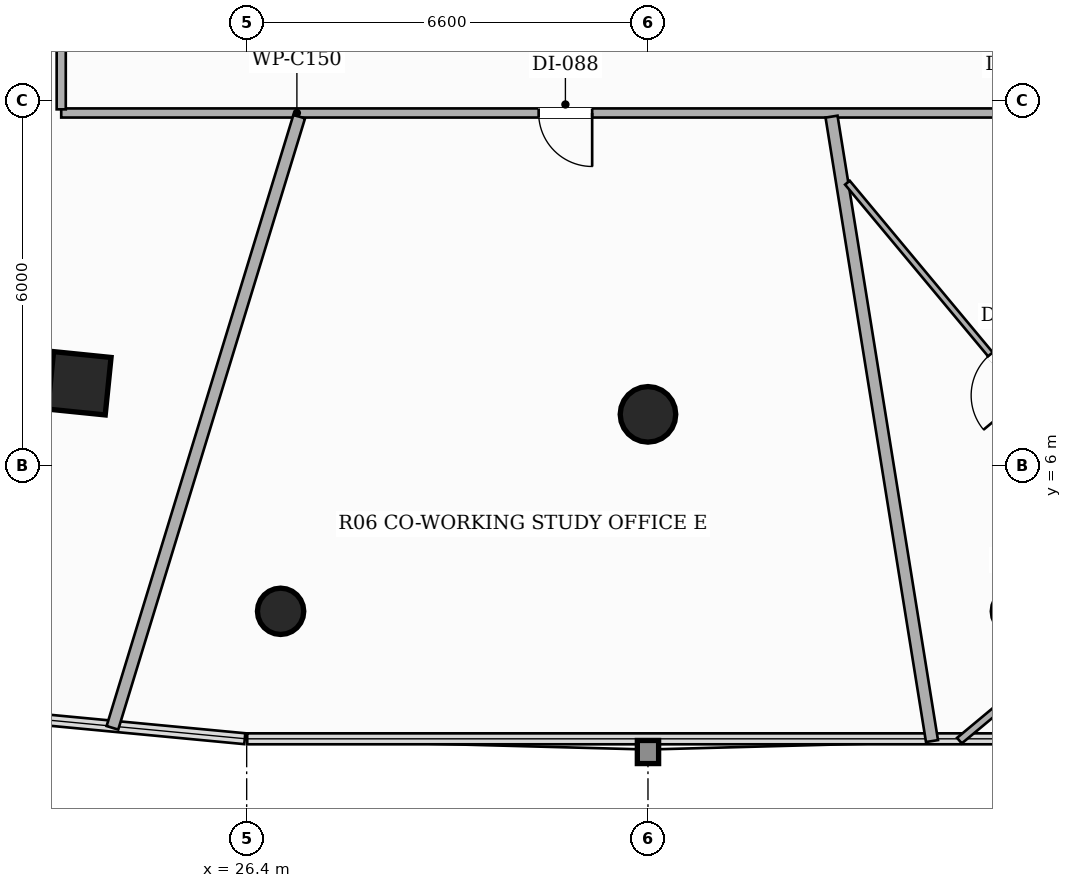
"""IFC4 building model, lengths in metres.
Left out: names, types, materials, properties, quantities, classifications, styles, units other than length and angle.
Written with IfcOpenShell. Run it as: python <this file> out.ifc"""

import sys

from ifc_helpers import new_model, si_unit, direction, frame, frame_2d, origin, origin_2d, place, context, subcontext, project, spatial, rectangle, hollow_rectangle, hollow_circle, extrude, element, fill, save


model = new_model("IFC4")
c1 = context("Model", 3, precision=1e-05, world=origin(), true_north=direction((0.0, 1.0)))
c2 = subcontext(c1, "Body", "Model", "MODEL_VIEW")
j1 = project(units=[si_unit("LENGTHUNIT", "METRE"), si_unit("PLANEANGLEUNIT", "RADIAN")], contexts=[c1])
p1 = place(None, origin())
s1 = spatial("IfcSite", under=j1, at=p1, CompositionType="ELEMENT")
p2 = place(p1, origin())
s2 = spatial("IfcBuilding", under=s1, at=p2, CompositionType="ELEMENT")
p3 = place(p2, frame((0.0, 0.0, 43.4)))
s3 = spatial("IfcBuildingStorey", under=s2, at=p3, CompositionType="ELEMENT", Elevation=43.4)
p4 = place(p3, frame((23.649, 7.355, 0.0), z_axis=(0.0, 0.0, 1.0), x_axis=(-0.994880708829, 0.101056297183, 0.0)))
e1 = element("IfcColumn", 1, at=p4, inside=s3, PredefinedType="COLUMN", context=c2, shape_type="SweptSolid", body=[
    extrude(hollow_rectangle(XDim=0.95, YDim=0.95, WallThickness=0.032, at=origin_2d()), origin(), (0.0, 0.0, 1.0), 3.3),
])
p5 = place(p3, frame((33.0, 6.844, 0.0), z_axis=(0.0, 0.0, 1.0), x_axis=(1.0, 0.0, 0.0)))
e2 = element("IfcColumn", 2, at=p5, inside=s3, PredefinedType="COLUMN", context=c2, shape_type="SweptSolid", body=[
    extrude(hollow_circle(Radius=0.457, WallThickness=0.025, at=origin_2d()), origin(), (0.0, 0.0, 1.0), 3.3),
])
for number, where, z_axis, x_axis in (
    (3, (26.958, 3.605, 0.0), (0.0, 0.0, 1.0), (1.0, 0.0, 0.0)),
    (4, (39.042, 3.605, 0.0), (0.0, 0.0, 1.0), (1.0, 0.0, 0.0)),
):
    element("IfcColumn", number, at=place(p3, frame(where, z_axis=z_axis, x_axis=x_axis)), inside=s3, PredefinedType="COLUMN", context=c2, shape_type="SweptSolid", body=[
        extrude(hollow_circle(Radius=0.381, WallThickness=0.022, at=origin_2d()), origin(), (0.0, 0.0, 1.0), 3.3),
    ])
p6 = place(p3, frame((42.59, 11.8, 0.0), z_axis=(0.0, 0.0, 1.0), x_axis=(-1.0, 0.0, 0.0)))
e5 = element("IfcWall", 5, at=p6, inside=s3, PredefinedType="PARTITIONING", context=c2, shape_type="SweptSolid", body=[
    extrude(rectangle(XDim=19.24, YDim=0.15, at=frame_2d((9.62, 0.0))), origin(), (0.0, 0.0, 1.0), 2.669),
])
p7 = place(p6, frame((10.508, 0.0, 0.0)))
e6 = element("IfcOpeningElement", 6, at=p7, cuts=e5, PredefinedType="OPENING", context=c2, shape_type="SweptSolid", body=[
    extrude(rectangle(XDim=0.88, YDim=2.1, at=frame_2d((0.44, 1.05))), frame((0.0, 0.085, 0.0), z_axis=(0.0, -1.0, 0.0), x_axis=(1.0, 0.0, 0.0)), (0.0, 0.0, 1.0), 0.17),
])
p8 = place(p6, frame((2.98, 0.0, 0.0)))
e7 = element("IfcOpeningElement", 7, at=p8, cuts=e5, PredefinedType="OPENING", context=c2, shape_type="SweptSolid", body=[
    extrude(rectangle(XDim=0.92, YDim=2.15, at=frame_2d((0.46, 1.075))), frame((0.0, 0.085, 0.0), z_axis=(0.0, -1.0, 0.0), x_axis=(1.0, 0.0, 0.0)), (0.0, 0.0, 1.0), 0.17),
])
p9 = place(p3, frame((23.35, 11.86, 0.0), z_axis=(0.0, 0.0, 1.0), x_axis=(0.0, 1.0, 0.0)))
e8 = element("IfcWall", 8, at=p9, inside=s3, PredefinedType="PARTITIONING", context=c2, shape_type="SweptSolid", body=[
    extrude(rectangle(XDim=25.04, YDim=0.15, at=frame_2d((12.52, 0.0))), origin(), (0.0, 0.0, 1.0), 2.413),
])
p10 = place(p9, frame((18.67, 0.0, 0.0)))
e9 = element("IfcOpeningElement", 9, at=p10, cuts=e8, PredefinedType="OPENING", context=c2, shape_type="SweptSolid", body=[
    extrude(rectangle(XDim=0.88, YDim=2.1, at=frame_2d((0.44, 1.05))), frame((0.0, 0.085, 0.0), z_axis=(0.0, -1.0, 0.0), x_axis=(1.0, 0.0, 0.0)), (0.0, 0.0, 1.0), 0.17),
])
p11 = place(p9, frame((3.543, 0.0, 0.0)))
e10 = element("IfcOpeningElement", 10, at=p11, cuts=e8, PredefinedType="OPENING", context=c2, shape_type="SweptSolid", body=[
    extrude(rectangle(XDim=0.88, YDim=2.1, at=frame_2d((0.44, 1.05))), frame((0.0, 0.085, 0.0), z_axis=(0.0, -1.0, 0.0), x_axis=(1.0, 0.0, 0.0)), (0.0, 0.0, 1.0), 0.17),
])
p12 = place(p9, frame((8.445, 0.0, 0.0)))
e11 = element("IfcOpeningElement", 11, at=p12, cuts=e8, PredefinedType="OPENING", context=c2, shape_type="SweptSolid", body=[
    extrude(rectangle(XDim=0.92, YDim=2.15, at=frame_2d((0.46, 1.075))), frame((0.0, 0.085, 0.0), z_axis=(0.0, -1.0, 0.0), x_axis=(1.0, 0.0, 0.0)), (0.0, 0.0, 1.0), 0.17),
])
p13 = place(p9, frame((11.535, 0.0, 0.0)))
e12 = element("IfcOpeningElement", 12, at=p13, cuts=e8, PredefinedType="OPENING", context=c2, shape_type="SweptSolid", body=[
    extrude(rectangle(XDim=0.92, YDim=2.15, at=frame_2d((0.46, 1.075))), frame((0.0, 0.085, 0.0), z_axis=(0.0, -1.0, 0.0), x_axis=(1.0, 0.0, 0.0)), (0.0, 0.0, 1.0), 0.17),
])
p14 = place(p3, frame((27.264, 11.74, 0.0), z_axis=(0.0, 0.0, 1.0), x_axis=(-0.292294665238, -0.956328305904, 0.0)))
e13 = element("IfcWall", 13, at=p14, inside=s3, PredefinedType="PARTITIONING", context=c2, shape_type="SweptSolid", body=[
    extrude(rectangle(XDim=10.51, YDim=0.2, at=frame_2d((5.255, 0.0))), origin(), (0.0, 0.0, 1.0), 2.413),
])
p15 = place(p3, frame((9.097, 3.318, 0.0), z_axis=(0.0, 0.0, 1.0), x_axis=(0.66036589704, 0.750943993935, 0.0)))
e14 = element("IfcWall", 14, at=p15, inside=s3, PredefinedType="PARTITIONING", context=c2, shape_type="SweptSolid", body=[
    extrude(rectangle(XDim=21.493, YDim=0.2, at=frame_2d((10.747, 0.0))), origin(), (0.0, 0.0, 1.0), 2.413),
])
p16 = place(p3, frame((36.019, 11.74, 0.0), z_axis=(0.0, 0.0, 1.0), x_axis=(0.158816201081, -0.98730816581, 0.0)))
e15 = element("IfcWall", 15, at=p16, inside=s3, PredefinedType="PARTITIONING", context=c2, shape_type="SweptSolid", body=[
    extrude(rectangle(XDim=10.401, YDim=0.2, at=frame_2d((5.201, 0.0))), origin(), (0.0, 0.0, 1.0), 2.413),
])
p17 = place(p3, frame((4.362, 6.486, 0.0), z_axis=(0.0, 0.0, 1.0), x_axis=(0.766256370513, 0.642534959865, 0.0)))
e16 = element("IfcWall", 16, at=p17, inside=s3, PredefinedType="PARTITIONING", context=c2, shape_type="SweptSolid", body=[
    extrude(rectangle(XDim=24.702, YDim=0.2, at=frame_2d((12.351, 0.0))), origin(), (0.0, 0.0, 1.0), 2.413),
])
p18 = place(p3, frame((41.547, 4.331, 0.0), z_axis=(0.0, 0.0, 1.0), x_axis=(-0.640035566376, 0.768345282913, 0.0)))
e17 = element("IfcWall", 17, at=p18, inside=s3, PredefinedType="PARTITIONING", context=c2, shape_type="SweptSolid", body=[
    extrude(rectangle(XDim=8.229, YDim=0.1, at=frame_2d((4.115, 0.0))), origin(), (0.0, 0.0, 1.0), 2.413),
])
p19 = place(p18, frame((3.675, 0.0, 0.0)))
e18 = element("IfcOpeningElement", 18, at=p19, cuts=e17, PredefinedType="OPENING", context=c2, shape_type="SweptSolid", body=[
    extrude(rectangle(XDim=0.88, YDim=2.1, at=frame_2d((0.44, 1.05))), frame((0.0, 0.06, 0.0), z_axis=(0.0, -1.0, 0.0), x_axis=(1.0, 0.0, 0.0)), (0.0, 0.0, 1.0), 0.12),
])
p20 = place(p3, frame((38.122, 1.478, 0.0), z_axis=(0.0, 0.0, 1.0), x_axis=(0.768351451836, 0.640028160678, 0.0)))
e19 = element("IfcWall", 19, at=p20, inside=s3, PredefinedType="PARTITIONING", context=c2, shape_type="SweptSolid", body=[
    extrude(rectangle(XDim=4.458, YDim=0.12, at=frame_2d((2.229, 0.0))), origin(), (0.0, 0.0, 1.0), 3.06),
])
p21 = place(p7, origin())
e20 = element("IfcDoor", 20, at=p21, inside=s3, OperationType="SINGLE_SWING_LEFT", PredefinedType="DOOR", context=c2, shape_type="SweptSolid", body=[
    extrude(rectangle(XDim=0.88, YDim=2.1, at=frame_2d((0.44, 1.05))), frame((0.0, 0.025, 0.0), z_axis=(0.0, -1.0, 0.0), x_axis=(1.0, 0.0, 0.0)), (0.0, 0.0, 1.0), 0.05),
])
fill(e6, e20)
p22 = place(p19, origin())
e21 = element("IfcDoor", 21, at=p22, inside=s3, OperationType="SINGLE_SWING_LEFT", PredefinedType="DOOR", context=c2, shape_type="SweptSolid", body=[
    extrude(rectangle(XDim=0.88, YDim=2.1, at=frame_2d((0.44, 1.05))), frame((0.0, 0.025, 0.0), z_axis=(0.0, -1.0, 0.0), x_axis=(1.0, 0.0, 0.0)), (0.0, 0.0, 1.0), 0.05),
])
fill(e18, e21)
save(model, sys.argv[1])
